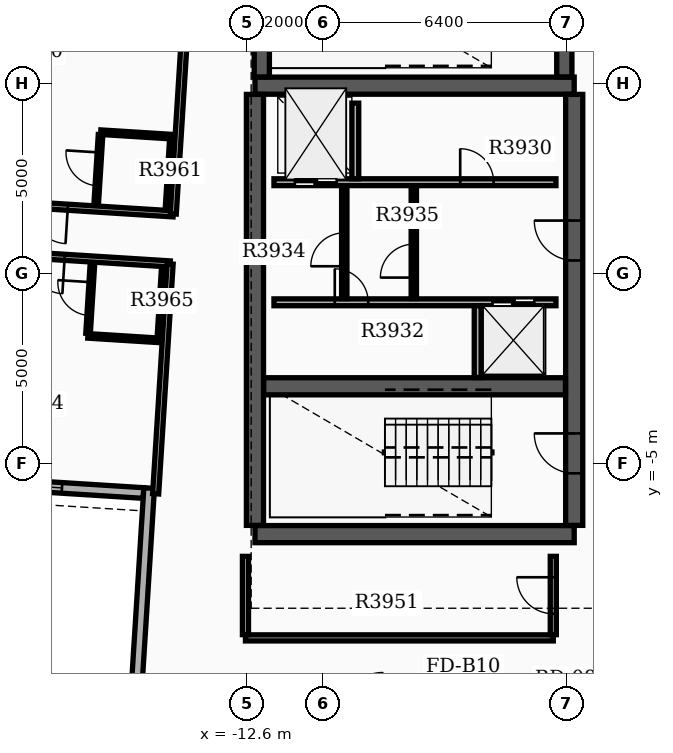
"""IFC4 building model, lengths in metres.
Left out: names, types, materials, properties, quantities, classifications, styles, units other than length and angle.
Written with IfcOpenShell. Run it as: python <this file> out.ifc"""

import sys

from ifc_helpers import new_model, si_unit, direction, frame, frame_2d, origin, place, context, subcontext, project, spatial, rectangle, extrude, element, fill, save


model = new_model("IFC4")
c1 = context("Model", 3, precision=1e-05, world=origin(), true_north=direction((0.0, 1.0)))
c2 = subcontext(c1, "Body", "Model", "MODEL_VIEW")
j1 = project(units=[si_unit("LENGTHUNIT", "METRE"), si_unit("PLANEANGLEUNIT", "RADIAN")], contexts=[c1])
p1 = place(None, origin())
s1 = spatial("IfcSite", under=j1, at=p1, CompositionType="ELEMENT")
p2 = place(p1, origin())
s2 = spatial("IfcBuilding", under=s1, at=p2, CompositionType="ELEMENT")
p3 = place(p2, frame((0.0, 0.0, 249.9)))
s3 = spatial("IfcBuildingStorey", under=s2, at=p3, CompositionType="ELEMENT", Elevation=249.9)
for number, where, z_axis, x_axis in (
    (1, (-12.4, -6.85, 0.0), (0.0, 0.0, 1.0), (1.0, 0.0, 0.0)),
    (2, (-12.4, 4.95, 0.0), (0.0, 0.0, 1.0), (1.0, 0.0, 0.0)),
):
    element("IfcWall", number, at=place(p3, frame(where, z_axis=z_axis, x_axis=x_axis)), inside=s3, PredefinedType="SHEAR", context=c2, shape_type="SweptSolid", body=[
        extrude(rectangle(XDim=8.4, YDim=0.45, at=frame_2d((4.2, 0.0))), origin(), (0.0, 0.0, 1.0), 3.7),
    ])
p4 = place(p3, frame((-12.4, -6.62, 0.0), z_axis=(0.0, 0.0, 1.0), x_axis=(0.0, 1.0, 0.0)))
e3 = element("IfcWall", 3, at=p4, inside=s3, PredefinedType="SHEAR", context=c2, shape_type="SweptSolid", body=[
    extrude(rectangle(XDim=11.34, YDim=0.45, at=frame_2d((5.67, 0.0))), origin(), (0.0, 0.0, 1.0), 3.7),
])
p5 = place(p3, frame((-4.0, -6.62, 0.0), z_axis=(0.0, 0.0, 1.0), x_axis=(0.0, 1.0, 0.0)))
e4 = element("IfcWall", 4, at=p5, inside=s3, PredefinedType="SHEAR", context=c2, shape_type="SweptSolid", body=[
    extrude(rectangle(XDim=11.34, YDim=0.45, at=frame_2d((5.67, 0.0))), origin(), (0.0, 0.0, 1.0), 3.7),
])
p6 = place(p5, frame((1.37, 0.0, 0.0)))
e5 = element("IfcOpeningElement", 5, at=p6, cuts=e4, PredefinedType="OPENING", context=c2, shape_type="SweptSolid", body=[
    extrude(rectangle(XDim=1.05, YDim=2.15, at=frame_2d((0.525, 1.075))), frame((0.0, 0.235, 0.0), z_axis=(0.0, -1.0, 0.0), x_axis=(1.0, 0.0, 0.0)), (0.0, 0.0, 1.0), 0.47),
])
p7 = place(p5, frame((6.97, 0.0, 0.0)))
e6 = element("IfcOpeningElement", 6, at=p7, cuts=e4, PredefinedType="OPENING", context=c2, shape_type="SweptSolid", body=[
    extrude(rectangle(XDim=1.05, YDim=2.15, at=frame_2d((0.525, 1.075))), frame((0.0, 0.235, 0.0), z_axis=(0.0, -1.0, 0.0), x_axis=(1.0, 0.0, 0.0)), (0.0, 0.0, 1.0), 0.47),
])
p8 = place(p3, frame((-12.17, -2.96, 0.0), z_axis=(0.0, 0.0, 1.0), x_axis=(1.0, 0.0, 0.0)))
e7 = element("IfcWall", 7, at=p8, inside=s3, PredefinedType="SHEAR", context=c2, shape_type="SweptSolid", body=[
    extrude(rectangle(XDim=7.94, YDim=0.45, at=frame_2d((3.97, 0.0))), origin(), (0.0, 0.0, 1.0), 3.7),
])
p9 = place(p3, frame((-12.22, 5.18, 0.0), z_axis=(0.0, 0.0, 1.0), x_axis=(0.0, 1.0, 0.0)))
e8 = element("IfcWall", 8, at=p9, inside=s3, PredefinedType="SHEAR", context=c2, shape_type="SweptSolid", body=[
    extrude(rectangle(XDim=3.655, YDim=0.4, at=frame_2d((1.828, 0.0))), origin(), (0.0, 0.0, 1.0), 3.7),
])
p10 = place(p3, frame((-4.26, 5.18, 0.0), z_axis=(0.0, 0.0, 1.0), x_axis=(0.0, 1.0, 0.0)))
e9 = element("IfcWall", 9, at=p10, inside=s3, PredefinedType="SHEAR", context=c2, shape_type="SweptSolid", body=[
    extrude(rectangle(XDim=3.655, YDim=0.4, at=frame_2d((1.828, 0.0))), origin(), (0.0, 0.0, 1.0), 3.7),
])
p11 = place(p10, frame((1.42, 0.0, 0.0)))
e10 = element("IfcOpeningElement", 10, at=p11, cuts=e9, PredefinedType="OPENING", context=c2, shape_type="SweptSolid", body=[
    extrude(rectangle(XDim=1.05, YDim=2.15, at=frame_2d((0.525, 1.075))), frame((0.0, 0.21, 0.0), z_axis=(0.0, -1.0, 0.0), x_axis=(1.0, 0.0, 0.0)), (0.0, 0.0, 1.0), 0.42),
])
p12 = place(p3, frame((-30.003, -4.846, 0.0), z_axis=(0.0, 0.0, 1.0), x_axis=(0.998027423805, -0.062779465852, 0.0)))
e11 = element("IfcWall", 11, at=p12, inside=s3, PredefinedType="STANDARD", context=c2, shape_type="SweptSolid", body=[
    extrude(rectangle(XDim=14.7, YDim=0.28, at=frame_2d((7.35, 0.0))), origin(), (0.0, 0.0, 1.0), 3.18),
])
p13 = place(p12, frame((0.85, 0.0, 0.8)))
e12 = element("IfcOpeningElement", 12, at=p13, cuts=e11, PredefinedType="OPENING", context=c2, shape_type="SweptSolid", body=[
    extrude(rectangle(XDim=1.6, YDim=1.7, at=frame_2d((0.8, 0.85))), frame((0.0, 0.15, 0.0), z_axis=(0.0, -1.0, 0.0), x_axis=(1.0, 0.0, 0.0)), (0.0, 0.0, 1.0), 0.3),
])
p14 = place(p12, frame((4.05, 0.0, 0.8)))
e13 = element("IfcOpeningElement", 13, at=p14, cuts=e11, PredefinedType="OPENING", context=c2, shape_type="SweptSolid", body=[
    extrude(rectangle(XDim=1.6, YDim=1.7, at=frame_2d((0.8, 0.85))), frame((0.0, 0.15, 0.0), z_axis=(0.0, -1.0, 0.0), x_axis=(1.0, 0.0, 0.0)), (0.0, 0.0, 1.0), 0.3),
])
p15 = place(p12, frame((7.75, 0.0, 0.8)))
e14 = element("IfcOpeningElement", 14, at=p15, cuts=e11, PredefinedType="OPENING", context=c2, shape_type="SweptSolid", body=[
    extrude(rectangle(XDim=1.6, YDim=1.7, at=frame_2d((0.8, 0.85))), frame((0.0, 0.15, 0.0), z_axis=(0.0, -1.0, 0.0), x_axis=(1.0, 0.0, 0.0)), (0.0, 0.0, 1.0), 0.3),
])
p16 = place(p12, frame((10.95, 0.0, 0.8)))
e15 = element("IfcOpeningElement", 15, at=p16, cuts=e11, PredefinedType="OPENING", context=c2, shape_type="SweptSolid", body=[
    extrude(rectangle(XDim=1.6, YDim=1.7, at=frame_2d((0.8, 0.85))), frame((0.0, 0.15, 0.0), z_axis=(0.0, -1.0, 0.0), x_axis=(1.0, 0.0, 0.0)), (0.0, 0.0, 1.0), 0.3),
])
p17 = place(p3, frame((-15.184, -5.638, 0.0), z_axis=(0.0, 0.0, 1.0), x_axis=(-0.062779317195, -0.998027433156, 0.0)))
e16 = element("IfcWall", 16, at=p17, inside=s3, PredefinedType="STANDARD", context=c2, shape_type="SweptSolid", body=[
    extrude(rectangle(XDim=6.86, YDim=0.28, at=frame_2d((3.43, 0.0))), origin(), (0.0, 0.0, 1.0), 3.18),
])
p18 = place(p3, frame((-11.9, 2.41, 0.0), z_axis=(0.0, 0.0, 1.0), x_axis=(1.0, 0.0, 0.0)))
e17 = element("IfcWall", 17, at=p18, inside=s3, PredefinedType="SOLIDWALL", context=c2, shape_type="SweptSolid", body=[
    extrude(rectangle(XDim=7.42, YDim=0.18, at=frame_2d((3.71, 0.0))), origin(), (0.0, 0.0, 1.0), 3.17),
])
p19 = place(p18, frame((0.55, 0.0, 0.0)))
e18 = element("IfcOpeningElement", 18, at=p19, cuts=e17, PredefinedType="OPENING", context=c2, shape_type="SweptSolid", body=[
    extrude(rectangle(XDim=1.1, YDim=2.15, at=frame_2d((0.55, 1.075))), frame((0.0, 0.1, 0.0), z_axis=(0.0, -1.0, 0.0), x_axis=(1.0, 0.0, 0.0)), (0.0, 0.0, 1.0), 0.2),
])
p20 = place(p18, frame((4.9, 0.0, 0.0)))
e19 = element("IfcOpeningElement", 19, at=p20, cuts=e17, PredefinedType="OPENING", context=c2, shape_type="SweptSolid", body=[
    extrude(rectangle(XDim=0.88, YDim=2.1, at=frame_2d((0.44, 1.05))), frame((0.0, 0.1, 0.0), z_axis=(0.0, -1.0, 0.0), x_axis=(1.0, 0.0, 0.0)), (0.0, 0.0, 1.0), 0.2),
])
p21 = place(p3, frame((-11.9, -0.75, 0.0), z_axis=(0.0, 0.0, 1.0), x_axis=(1.0, 0.0, 0.0)))
e20 = element("IfcWall", 20, at=p21, inside=s3, PredefinedType="SOLIDWALL", context=c2, shape_type="SweptSolid", body=[
    extrude(rectangle(XDim=7.42, YDim=0.18, at=frame_2d((3.71, 0.0))), origin(), (0.0, 0.0, 1.0), 3.17),
])
p22 = place(p21, frame((5.75, 0.0, 0.0)))
e21 = element("IfcOpeningElement", 21, at=p22, cuts=e20, PredefinedType="OPENING", context=c2, shape_type="SweptSolid", body=[
    extrude(rectangle(XDim=1.1, YDim=2.15, at=frame_2d((0.55, 1.075))), frame((0.0, 0.1, 0.0), z_axis=(0.0, -1.0, 0.0), x_axis=(1.0, 0.0, 0.0)), (0.0, 0.0, 1.0), 0.2),
])
p23 = place(p21, frame((1.6, 0.0, 0.0)))
e22 = element("IfcOpeningElement", 22, at=p23, cuts=e20, PredefinedType="OPENING", context=c2, shape_type="SweptSolid", body=[
    extrude(rectangle(XDim=0.88, YDim=2.1, at=frame_2d((0.44, 1.05))), frame((0.0, 0.1, 0.0), z_axis=(0.0, -1.0, 0.0), x_axis=(1.0, 0.0, 0.0)), (0.0, 0.0, 1.0), 0.2),
])
p24 = place(p3, frame((-9.76, 2.5, 0.0), z_axis=(0.0, 0.0, 1.0), x_axis=(0.0, 1.0, 0.0)))
e23 = element("IfcWall", 23, at=p24, inside=s3, PredefinedType="SOLIDWALL", context=c2, shape_type="SweptSolid", body=[
    extrude(rectangle(XDim=1.99, YDim=0.18, at=frame_2d((0.995, 0.0))), origin(), (0.0, 0.0, 1.0), 3.17),
])
p25 = place(p3, frame((-6.54, -2.73, 0.0), z_axis=(0.0, 0.0, 1.0), x_axis=(0.0, 1.0, 0.0)))
e24 = element("IfcWall", 24, at=p25, inside=s3, PredefinedType="SOLIDWALL", context=c2, shape_type="SweptSolid", body=[
    extrude(rectangle(XDim=1.89, YDim=0.18, at=frame_2d((0.945, 0.0))), origin(), (0.0, 0.0, 1.0), 3.17),
])
p26 = place(p3, frame((-8.22, -0.65, 0.0), z_axis=(0.0, 0.0, 1.0), x_axis=(0.0, 1.0, 0.0)))
e25 = element("IfcWall", 25, at=p26, inside=s3, PredefinedType="SOLIDWALL", context=c2, shape_type="SweptSolid", body=[
    extrude(rectangle(XDim=2.96, YDim=0.14, at=frame_2d((1.48, 0.0))), origin(), (0.0, 0.0, 1.0), 3.17),
])
p27 = place(p26, frame((0.55, 0.0, 0.0)))
e26 = element("IfcOpeningElement", 26, at=p27, cuts=e25, PredefinedType="OPENING", context=c2, shape_type="SweptSolid", body=[
    extrude(rectangle(XDim=0.88, YDim=2.1, at=frame_2d((0.44, 1.05))), frame((0.0, 0.08, 0.0), z_axis=(0.0, -1.0, 0.0), x_axis=(1.0, 0.0, 0.0)), (0.0, 0.0, 1.0), 0.16),
])
p28 = place(p3, frame((-10.05, -0.652, 0.0), z_axis=(0.0, 0.0, 1.0), x_axis=(0.0, 1.0, 0.0)))
e27 = element("IfcWall", 27, at=p28, inside=s3, PredefinedType="PARTITIONING", context=c2, shape_type="SweptSolid", body=[
    extrude(rectangle(XDim=2.962, YDim=0.14, at=frame_2d((1.481, 0.0))), origin(), (0.0, 0.0, 1.0), 3.17),
])
p29 = place(p28, frame((0.85, 0.0, 0.0)))
e28 = element("IfcOpeningElement", 28, at=p29, cuts=e27, PredefinedType="OPENING", context=c2, shape_type="SweptSolid", body=[
    extrude(rectangle(XDim=0.88, YDim=2.1, at=frame_2d((0.44, 1.05))), frame((0.0, 0.08, 0.0), z_axis=(0.0, -1.0, 0.0), x_axis=(1.0, 0.0, 0.0)), (0.0, 0.0, 1.0), 0.16),
])
p30 = place(p3, frame((-12.65, -9.58, 0.0), z_axis=(0.0, 0.0, 1.0), x_axis=(1.0, 0.0, 0.0)))
e29 = element("IfcWall", 29, at=p30, inside=s3, PredefinedType="PARTITIONING", context=c2, shape_type="SweptSolid", body=[
    extrude(rectangle(XDim=8.1, YDim=0.16, at=frame_2d((4.05, 0.0))), origin(), (0.0, 0.0, 1.0), 3.17),
])
p31 = place(p3, frame((-12.65, -9.495, 0.0), z_axis=(0.0, 0.0, 1.0), x_axis=(0.0, 1.0, 0.0)))
e30 = element("IfcWall", 30, at=p31, inside=s3, PredefinedType="PARTITIONING", context=c2, shape_type="SweptSolid", body=[
    extrude(rectangle(XDim=2.06, YDim=0.16, at=frame_2d((1.03, 0.0))), origin(), (0.0, 0.0, 1.0), 3.17),
])
p32 = place(p3, frame((-4.55, -9.495, 0.0), z_axis=(0.0, 0.0, 1.0), x_axis=(0.0, 1.0, 0.0)))
e31 = element("IfcWall", 31, at=p32, inside=s3, PredefinedType="PARTITIONING", context=c2, shape_type="SweptSolid", body=[
    extrude(rectangle(XDim=2.06, YDim=0.16, at=frame_2d((1.03, 0.0))), origin(), (0.0, 0.0, 1.0), 3.17),
])
p33 = place(p32, frame((0.55, 0.0, 0.0)))
e32 = element("IfcOpeningElement", 32, at=p33, cuts=e31, PredefinedType="OPENING", context=c2, shape_type="SweptSolid", body=[
    extrude(rectangle(XDim=0.96, YDim=2.15, at=frame_2d((0.48, 1.075))), frame((0.0, 0.09, 0.0), z_axis=(0.0, -1.0, 0.0), x_axis=(1.0, 0.0, 0.0)), (0.0, 0.0, 1.0), 0.18),
])
p34 = place(p3, frame((-14.55, 1.577, 0.0), z_axis=(0.0, 0.0, 1.0), x_axis=(-0.998026610596, 0.062792392385, 0.0)))
e33 = element("IfcWall", 33, at=p34, inside=s3, PredefinedType="PARTITIONING", context=c2, shape_type="SweptSolid", body=[
    extrude(rectangle(XDim=15.012, YDim=0.16, at=frame_2d((7.506, 0.0))), origin(), (0.0, 0.0, 1.0), 3.17),
])
p35 = place(p34, frame((2.78, 0.0, 0.0)))
e34 = element("IfcOpeningElement", 34, at=p35, cuts=e33, PredefinedType="OPENING", context=c2, shape_type="SweptSolid", body=[
    extrude(rectangle(XDim=0.96, YDim=2.15, at=frame_2d((0.48, 1.075))), frame((0.0, 0.09, 0.0), z_axis=(0.0, -1.0, 0.0), x_axis=(1.0, 0.0, 0.0)), (0.0, 0.0, 1.0), 0.18),
])
p36 = place(p34, frame((13.76, 0.0, 0.0)))
e35 = element("IfcOpeningElement", 35, at=p36, cuts=e33, PredefinedType="OPENING", context=c2, shape_type="SweptSolid", body=[
    extrude(rectangle(XDim=0.96, YDim=2.15, at=frame_2d((0.48, 1.075))), frame((0.0, 0.09, 0.0), z_axis=(0.0, -1.0, 0.0), x_axis=(1.0, 0.0, 0.0)), (0.0, 0.0, 1.0), 0.18),
])
p37 = place(p3, frame((-14.55, 1.577, 0.0), z_axis=(0.0, 0.0, 1.0), x_axis=(0.062807170557, 0.998025680695, 0.0)))
e36 = element("IfcWall", 36, at=p37, inside=s3, PredefinedType="PARTITIONING", context=c2, shape_type="SweptSolid", body=[
    extrude(rectangle(XDim=6.06, YDim=0.16, at=frame_2d((3.03, 0.0))), origin(), (0.0, 0.0, 1.0), 3.17),
])
p38 = place(p3, frame((-16.577, 1.844, 0.0), z_axis=(0.0, 0.0, 1.0), x_axis=(0.062779145668, 0.998027443946, 0.0)))
e37 = element("IfcWall", 37, at=p38, inside=s3, PredefinedType="PARTITIONING", context=c2, shape_type="SweptSolid", body=[
    extrude(rectangle(XDim=1.82, YDim=0.12, at=frame_2d((0.91, 0.0))), origin(), (0.0, 0.0, 1.0), 3.17),
])
p39 = place(p38, frame((0.47, 0.0, 0.0)))
e38 = element("IfcOpeningElement", 38, at=p39, cuts=e37, PredefinedType="OPENING", context=c2, shape_type="SweptSolid", body=[
    extrude(rectangle(XDim=0.88, YDim=2.1, at=frame_2d((0.44, 1.05))), frame((0.0, 0.07, 0.0), z_axis=(0.0, -1.0, 0.0), x_axis=(1.0, 0.0, 0.0)), (0.0, 0.0, 1.0), 0.14),
])
p40 = place(p3, frame((-14.701, 1.727, 0.0), z_axis=(0.0, 0.0, 1.0), x_axis=(0.062912758763, 0.998019030272, 0.0)))
e39 = element("IfcWall", 39, at=p40, inside=s3, PredefinedType="PARTITIONING", context=c2, shape_type="SweptSolid", body=[
    extrude(rectangle(XDim=1.82, YDim=0.12, at=frame_2d((0.91, 0.0))), origin(), (0.0, 0.0, 1.0), 3.17),
])
p41 = place(p3, frame((-14.582, 3.608, 0.0), z_axis=(0.0, 0.0, 1.0), x_axis=(-0.998022650819, 0.062855297722, 0.0)))
e40 = element("IfcWall", 40, at=p41, inside=s3, PredefinedType="PARTITIONING", context=c2, shape_type="SweptSolid", body=[
    extrude(rectangle(XDim=1.88, YDim=0.12, at=frame_2d((0.94, 0.0))), origin(), (0.0, 0.0, 1.0), 3.17),
])
p42 = place(p3, frame((-14.633, 0.259, 0.0), z_axis=(0.0, 0.0, 1.0), x_axis=(-0.998026674719, 0.062791373209, 0.0)))
e41 = element("IfcWall", 41, at=p42, inside=s3, PredefinedType="PARTITIONING", context=c2, shape_type="SweptSolid", body=[
    extrude(rectangle(XDim=15.012, YDim=0.16, at=frame_2d((7.506, 0.0))), origin(), (0.0, 0.0, 1.0), 3.17),
])
p43 = place(p42, frame((2.78, 0.0, 0.0)))
e42 = element("IfcOpeningElement", 42, at=p43, cuts=e41, PredefinedType="OPENING", context=c2, shape_type="SweptSolid", body=[
    extrude(rectangle(XDim=0.96, YDim=2.15, at=frame_2d((0.48, 1.075))), frame((0.0, 0.09, 0.0), z_axis=(0.0, -1.0, 0.0), x_axis=(1.0, 0.0, 0.0)), (0.0, 0.0, 1.0), 0.18),
])
p44 = place(p42, frame((13.76, 0.0, 0.0)))
e43 = element("IfcOpeningElement", 43, at=p44, cuts=e41, PredefinedType="OPENING", context=c2, shape_type="SweptSolid", body=[
    extrude(rectangle(XDim=0.96, YDim=2.15, at=frame_2d((0.48, 1.075))), frame((0.0, 0.09, 0.0), z_axis=(0.0, -1.0, 0.0), x_axis=(1.0, 0.0, 0.0)), (0.0, 0.0, 1.0), 0.18),
])
p45 = place(p3, frame((-14.633, 0.259, 0.0), z_axis=(0.0, 0.0, 1.0), x_axis=(-0.062807170557, -0.998025680695, 0.0)))
e44 = element("IfcWall", 44, at=p45, inside=s3, PredefinedType="PARTITIONING", context=c2, shape_type="SweptSolid", body=[
    extrude(rectangle(XDim=6.06, YDim=0.16, at=frame_2d((3.03, 0.0))), origin(), (0.0, 0.0, 1.0), 3.17),
])
p46 = place(p3, frame((-16.792, -1.569, 0.0), z_axis=(0.0, 0.0, 1.0), x_axis=(0.062645529196, 0.998035839873, 0.0)))
e45 = element("IfcWall", 45, at=p46, inside=s3, PredefinedType="PARTITIONING", context=c2, shape_type="SweptSolid", body=[
    extrude(rectangle(XDim=1.82, YDim=0.12, at=frame_2d((0.91, 0.0))), origin(), (0.0, 0.0, 1.0), 3.17),
])
p47 = place(p46, frame((0.47, 0.0, 0.0)))
e46 = element("IfcOpeningElement", 46, at=p47, cuts=e45, PredefinedType="OPENING", context=c2, shape_type="SweptSolid", body=[
    extrude(rectangle(XDim=0.88, YDim=2.1, at=frame_2d((0.44, 1.05))), frame((0.0, 0.07, 0.0), z_axis=(0.0, -1.0, 0.0), x_axis=(1.0, 0.0, 0.0)), (0.0, 0.0, 1.0), 0.14),
])
p48 = place(p3, frame((-14.915, -1.687, 0.0), z_axis=(0.0, 0.0, 1.0), x_axis=(0.062779145668, 0.998027443946, 0.0)))
e47 = element("IfcWall", 47, at=p48, inside=s3, PredefinedType="PARTITIONING", context=c2, shape_type="SweptSolid", body=[
    extrude(rectangle(XDim=1.82, YDim=0.12, at=frame_2d((0.91, 0.0))), origin(), (0.0, 0.0, 1.0), 3.17),
])
p49 = place(p3, frame((-14.919, -1.752, 0.0), z_axis=(0.0, 0.0, 1.0), x_axis=(-0.998022650819, 0.062855297722, 0.0)))
e48 = element("IfcWall", 48, at=p49, inside=s3, PredefinedType="PARTITIONING", context=c2, shape_type="SweptSolid", body=[
    extrude(rectangle(XDim=1.88, YDim=0.12, at=frame_2d((0.94, 0.0))), origin(), (0.0, 0.0, 1.0), 3.17),
])
p50 = place(p16, origin())
e49 = element("IfcWindow", 49, at=p50, inside=s3, PartitioningType="SINGLE_PANEL", PredefinedType="WINDOW", context=c2, shape_type="SweptSolid", body=[
    extrude(rectangle(XDim=1.6, YDim=1.7, at=frame_2d((0.8, 0.85))), frame((0.0, 0.03, 0.0), z_axis=(0.0, -1.0, 0.0), x_axis=(1.0, 0.0, 0.0)), (0.0, 0.0, 1.0), 0.06),
])
fill(e15, e49)
p51 = place(p6, origin())
e50 = element("IfcDoor", 50, at=p51, inside=s3, OperationType="SINGLE_SWING_RIGHT", PredefinedType="DOOR", context=c2, shape_type="SweptSolid", body=[
    extrude(rectangle(XDim=1.05, YDim=2.15, at=frame_2d((0.525, 1.075))), frame((0.0, 0.025, 0.0), z_axis=(0.0, -1.0, 0.0), x_axis=(1.0, 0.0, 0.0)), (0.0, 0.0, 1.0), 0.05),
])
fill(e5, e50)
p52 = place(p7, origin())
e51 = element("IfcDoor", 51, at=p52, inside=s3, OperationType="SINGLE_SWING_RIGHT", PredefinedType="DOOR", context=c2, shape_type="SweptSolid", body=[
    extrude(rectangle(XDim=1.05, YDim=2.15, at=frame_2d((0.525, 1.075))), frame((0.0, 0.025, 0.0), z_axis=(0.0, -1.0, 0.0), x_axis=(1.0, 0.0, 0.0)), (0.0, 0.0, 1.0), 0.05),
])
fill(e6, e51)
p53 = place(p19, origin())
e52 = element("IfcDoor", 52, at=p53, inside=s3, OperationType="DOUBLE_DOOR_SLIDING", PredefinedType="DOOR", context=c2, shape_type="SweptSolid", body=[
    extrude(rectangle(XDim=1.1, YDim=2.15, at=frame_2d((0.55, 1.075))), frame((0.0, 0.025, 0.0), z_axis=(0.0, -1.0, 0.0), x_axis=(1.0, 0.0, 0.0)), (0.0, 0.0, 1.0), 0.05),
])
fill(e18, e52)
p54 = place(p22, origin())
e53 = element("IfcDoor", 53, at=p54, inside=s3, OperationType="DOUBLE_DOOR_SLIDING", PredefinedType="DOOR", context=c2, shape_type="SweptSolid", body=[
    extrude(rectangle(XDim=1.1, YDim=2.15, at=frame_2d((0.55, 1.075))), frame((0.0, 0.025, 0.0), z_axis=(0.0, -1.0, 0.0), x_axis=(1.0, 0.0, 0.0)), (0.0, 0.0, 1.0), 0.05),
])
fill(e21, e53)
p55 = place(p20, origin())
e54 = element("IfcDoor", 54, at=p55, inside=s3, OperationType="SINGLE_SWING_LEFT", PredefinedType="DOOR", context=c2, shape_type="SweptSolid", body=[
    extrude(rectangle(XDim=0.88, YDim=2.1, at=frame_2d((0.44, 1.05))), frame((0.0, 0.025, 0.0), z_axis=(0.0, -1.0, 0.0), x_axis=(1.0, 0.0, 0.0)), (0.0, 0.0, 1.0), 0.05),
])
fill(e19, e54)
p56 = place(p23, origin())
e55 = element("IfcDoor", 55, at=p56, inside=s3, OperationType="SINGLE_SWING_LEFT", PredefinedType="DOOR", context=c2, shape_type="SweptSolid", body=[
    extrude(rectangle(XDim=0.88, YDim=2.1, at=frame_2d((0.44, 1.05))), frame((0.0, 0.025, 0.0), z_axis=(0.0, -1.0, 0.0), x_axis=(1.0, 0.0, 0.0)), (0.0, 0.0, 1.0), 0.05),
])
fill(e22, e55)
p57 = place(p27, origin())
e56 = element("IfcDoor", 56, at=p57, inside=s3, OperationType="SINGLE_SWING_LEFT", PredefinedType="DOOR", context=c2, shape_type="SweptSolid", body=[
    extrude(rectangle(XDim=0.88, YDim=2.1, at=frame_2d((0.44, 1.05))), frame((0.0, 0.025, 0.0), z_axis=(0.0, -1.0, 0.0), x_axis=(1.0, 0.0, 0.0)), (0.0, 0.0, 1.0), 0.05),
])
fill(e26, e56)
p58 = place(p29, origin())
e57 = element("IfcDoor", 57, at=p58, inside=s3, OperationType="SINGLE_SWING_LEFT", PredefinedType="DOOR", context=c2, shape_type="SweptSolid", body=[
    extrude(rectangle(XDim=0.88, YDim=2.1, at=frame_2d((0.44, 1.05))), frame((0.0, 0.025, 0.0), z_axis=(0.0, -1.0, 0.0), x_axis=(1.0, 0.0, 0.0)), (0.0, 0.0, 1.0), 0.05),
])
fill(e28, e57)
p59 = place(p33, origin())
e58 = element("IfcDoor", 58, at=p59, inside=s3, OperationType="SINGLE_SWING_RIGHT", PredefinedType="DOOR", context=c2, shape_type="SweptSolid", body=[
    extrude(rectangle(XDim=0.96, YDim=2.15, at=frame_2d((0.48, 1.075))), frame((0.0, 0.025, 0.0), z_axis=(0.0, -1.0, 0.0), x_axis=(1.0, 0.0, 0.0)), (0.0, 0.0, 1.0), 0.05),
])
fill(e32, e58)
p60 = place(p35, origin())
e59 = element("IfcDoor", 59, at=p60, inside=s3, OperationType="SINGLE_SWING_LEFT", PredefinedType="DOOR", context=c2, shape_type="SweptSolid", body=[
    extrude(rectangle(XDim=0.96, YDim=2.15, at=frame_2d((0.48, 1.075))), frame((0.0, 0.025, 0.0), z_axis=(0.0, -1.0, 0.0), x_axis=(1.0, 0.0, 0.0)), (0.0, 0.0, 1.0), 0.05),
])
fill(e34, e59)
p61 = place(p39, origin())
e60 = element("IfcDoor", 60, at=p61, inside=s3, OperationType="SINGLE_SWING_RIGHT", PredefinedType="DOOR", context=c2, shape_type="SweptSolid", body=[
    extrude(rectangle(XDim=0.88, YDim=2.1, at=frame_2d((0.44, 1.05))), frame((0.0, 0.025, 0.0), z_axis=(0.0, -1.0, 0.0), x_axis=(1.0, 0.0, 0.0)), (0.0, 0.0, 1.0), 0.05),
])
fill(e38, e60)
p62 = place(p43, origin())
e61 = element("IfcDoor", 61, at=p62, inside=s3, OperationType="SINGLE_SWING_LEFT", PredefinedType="DOOR", context=c2, shape_type="SweptSolid", body=[
    extrude(rectangle(XDim=0.96, YDim=2.15, at=frame_2d((0.48, 1.075))), frame((0.0, 0.025, 0.0), z_axis=(0.0, -1.0, 0.0), x_axis=(1.0, 0.0, 0.0)), (0.0, 0.0, 1.0), 0.05),
])
fill(e42, e61)
p63 = place(p47, origin())
e62 = element("IfcDoor", 62, at=p63, inside=s3, OperationType="SINGLE_SWING_RIGHT", PredefinedType="DOOR", context=c2, shape_type="SweptSolid", body=[
    extrude(rectangle(XDim=0.88, YDim=2.1, at=frame_2d((0.44, 1.05))), frame((0.0, 0.025, 0.0), z_axis=(0.0, -1.0, 0.0), x_axis=(1.0, 0.0, 0.0)), (0.0, 0.0, 1.0), 0.05),
])
fill(e46, e62)
save(model, sys.argv[1])
